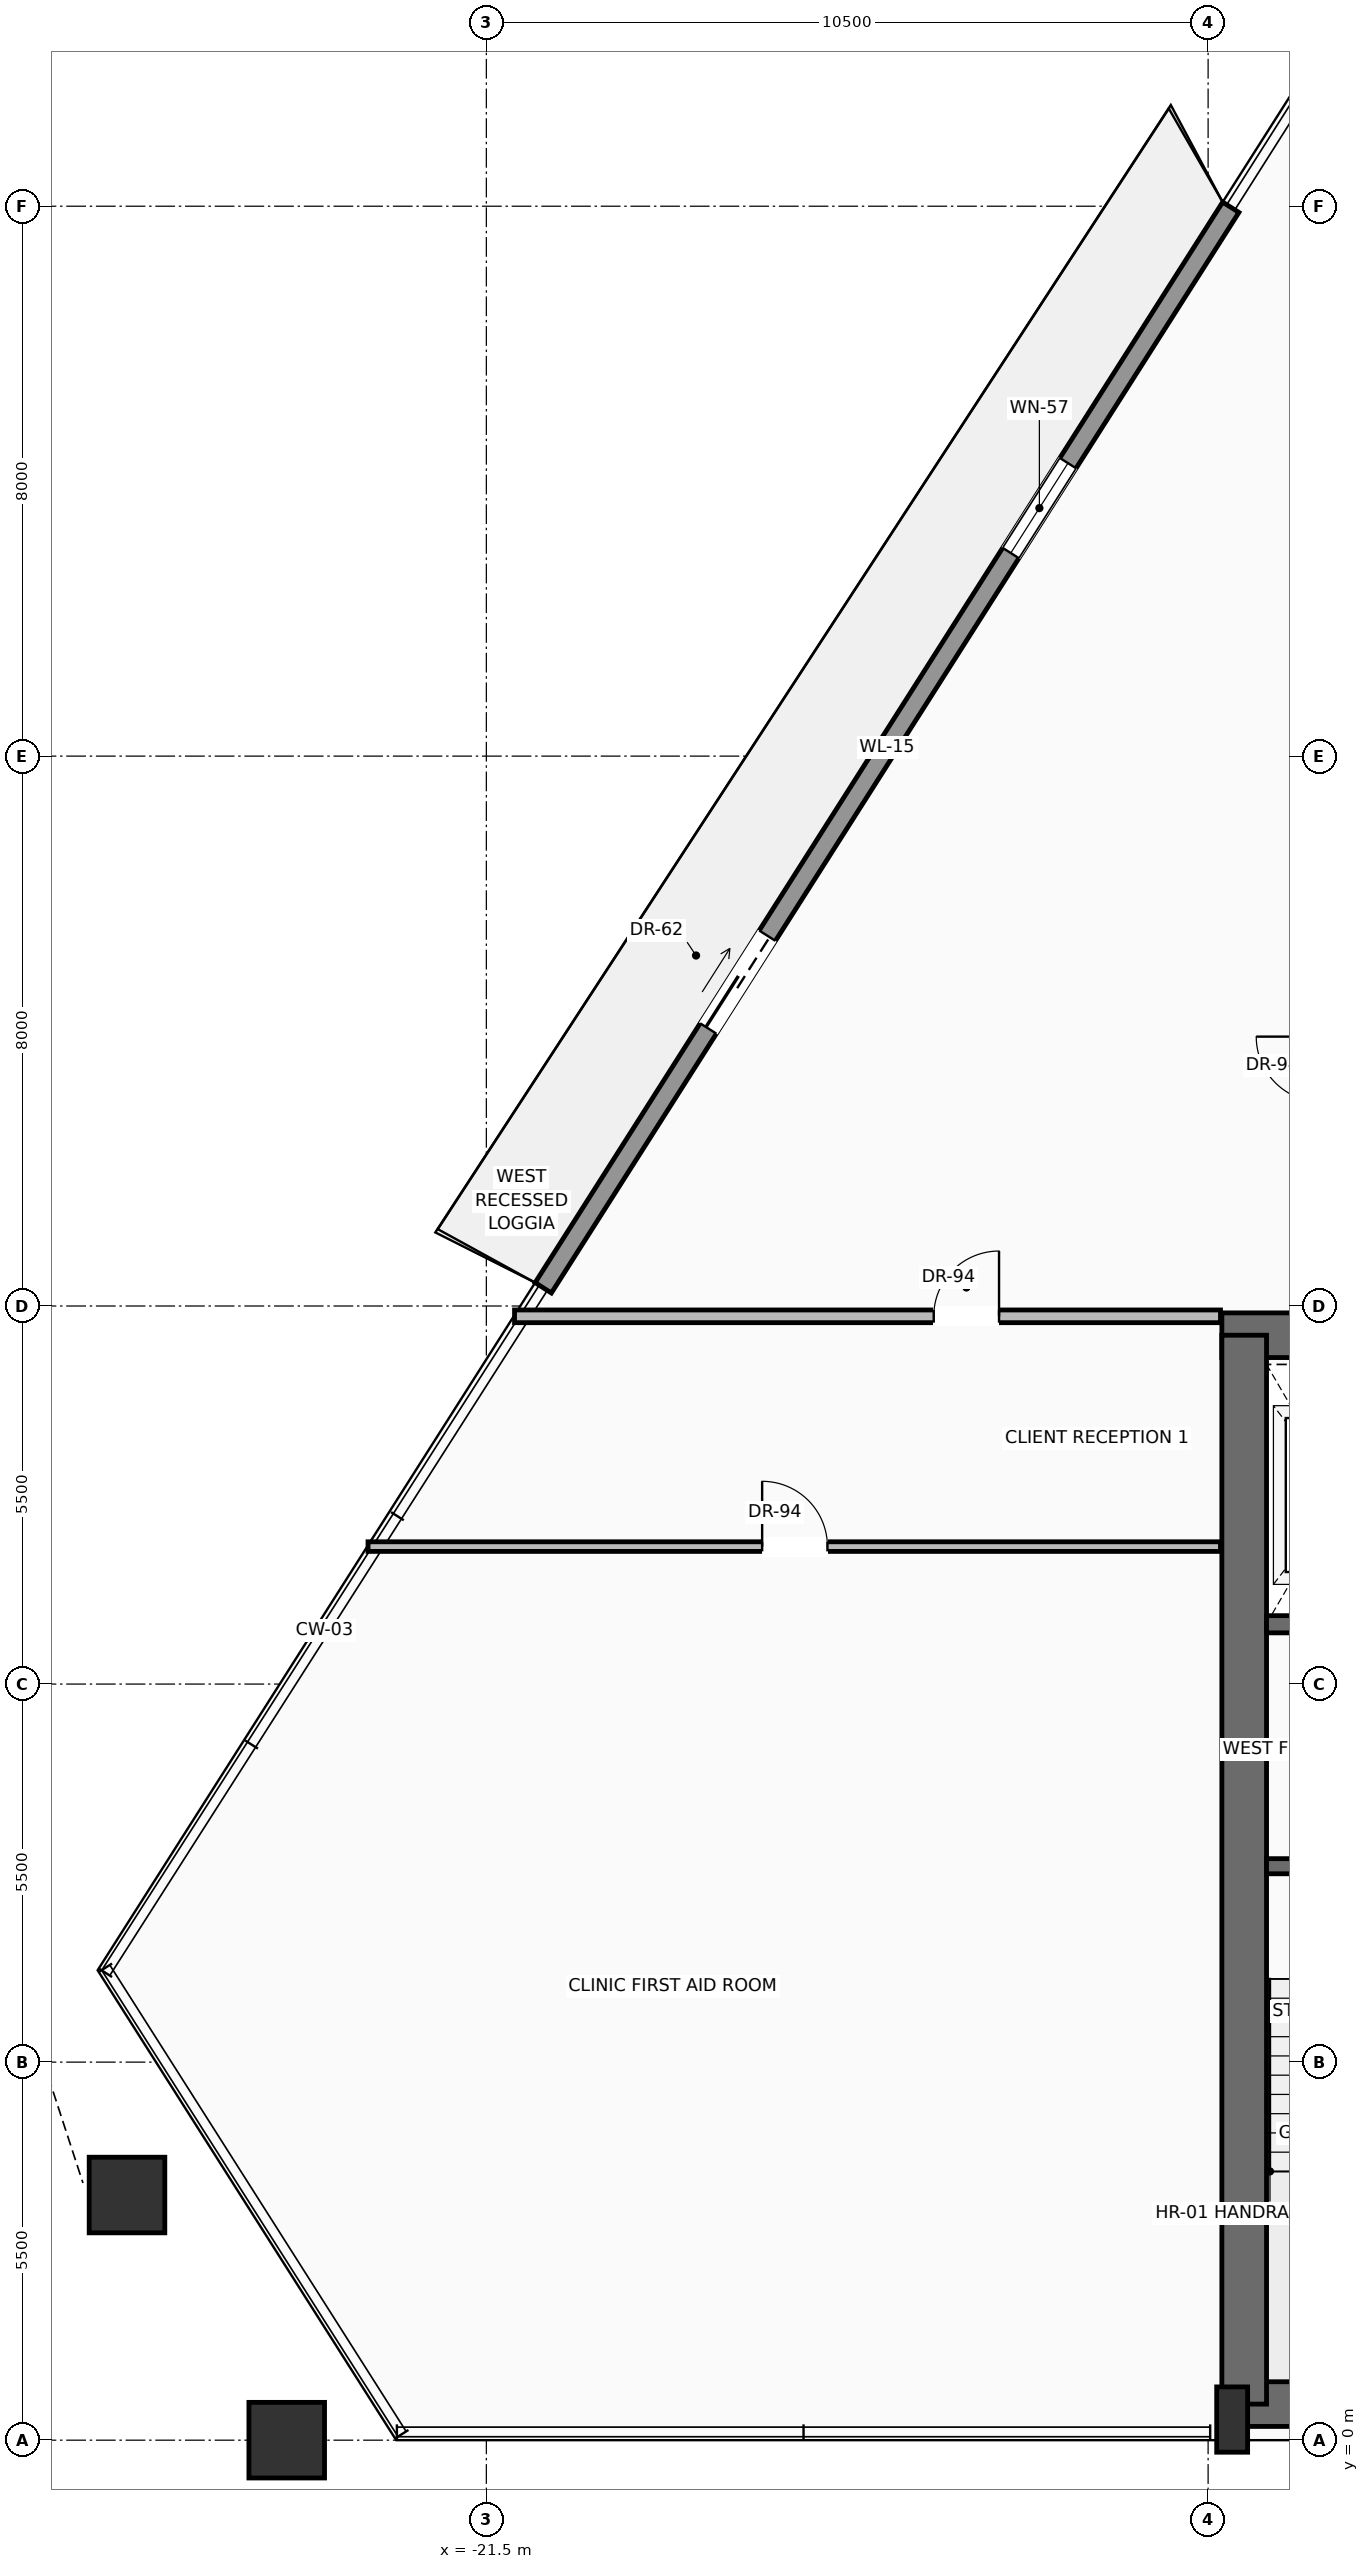
"""IFC4 building model, lengths in metres.
Left out: names, types, materials, properties, quantities, classifications, styles, units other than length and angle.
Written with IfcOpenShell. Run it as: python <this file> out.ifc"""

import sys

from ifc_helpers import new_model, si_unit, direction, frame, frame_2d, origin, origin_2d, place, context, subcontext, project, spatial, rectangle, hollow_rectangle, extrude, source, transform, mapped, element, fill, save


model = new_model("IFC4")
c1 = context("Model", 3, precision=1e-05, world=origin(), true_north=direction((0.0, 1.0)))
c2 = subcontext(c1, "Body", "Model", "MODEL_VIEW")
j1 = project(units=[si_unit("LENGTHUNIT", "METRE"), si_unit("PLANEANGLEUNIT", "RADIAN")], contexts=[c1])
p1 = place(None, origin())
s1 = spatial("IfcSite", under=j1, at=p1, CompositionType="ELEMENT")
p2 = place(p1, origin())
s2 = spatial("IfcBuilding", under=s1, at=p2, CompositionType="ELEMENT")
p3 = place(p2, frame((0.0, 0.0, 162.6)))
s3 = spatial("IfcBuildingStorey", under=s2, at=p3, CompositionType="ELEMENT", Elevation=162.6)
p4 = place(p3, frame((-10.65, 0.525, 0.0), z_axis=(0.0, 0.0, 1.0), x_axis=(1.0, 0.0, 0.0)))
e1 = element("IfcWall", 1, at=p4, inside=s3, PredefinedType="SHEAR", context=c2, shape_type="SweptSolid", body=[
    extrude(rectangle(XDim=21.3, YDim=0.65, at=frame_2d((10.65, 0.0))), origin(), (0.0, 0.0, 1.0), 3.4),
])
p5 = place(p3, frame((-10.8, 16.075, 0.0), z_axis=(0.0, 0.0, 1.0), x_axis=(1.0, 0.0, 0.0)))
e2 = element("IfcWall", 2, at=p5, inside=s3, PredefinedType="SHEAR", context=c2, shape_type="SweptSolid", body=[
    extrude(rectangle(XDim=21.6, YDim=0.65, at=frame_2d((10.8, 0.0))), origin(), (0.0, 0.0, 1.0), 3.4),
])
p6 = place(p5, frame((3.37, 0.0, 0.0)))
e3 = element("IfcOpeningElement", 3, at=p6, cuts=e2, PredefinedType="OPENING", context=c2, shape_type="SweptSolid", body=[
    extrude(rectangle(XDim=1.3, YDim=2.3, at=frame_2d((0.65, 1.15))), frame((0.0, 0.335, 0.0), z_axis=(0.0, -1.0, 0.0), x_axis=(1.0, 0.0, 0.0)), (0.0, 0.0, 1.0), 0.67),
])
p7 = place(p5, frame((9.8, 0.0, 0.0)))
e4 = element("IfcOpeningElement", 4, at=p7, cuts=e2, PredefinedType="OPENING", context=c2, shape_type="SweptSolid", body=[
    extrude(rectangle(XDim=2.0, YDim=2.4, at=frame_2d((1.0, 1.2))), frame((0.0, 0.335, 0.0), z_axis=(0.0, -1.0, 0.0), x_axis=(1.0, 0.0, 0.0)), (0.0, 0.0, 1.0), 0.67),
])
p8 = place(p3, frame((-10.475, 0.525, 0.0), z_axis=(0.0, 0.0, 1.0), x_axis=(0.0, 1.0, 0.0)))
e5 = element("IfcWall", 5, at=p8, inside=s3, PredefinedType="SHEAR", context=c2, shape_type="SweptSolid", body=[
    extrude(rectangle(XDim=15.55, YDim=0.65, at=frame_2d((7.775, 0.0))), origin(), (0.0, 0.0, 1.0), 3.4),
])
m1 = source(origin(), c2, "Body", "SweptSolid", [
    extrude(rectangle(XDim=0.45, YDim=0.95, at=origin_2d()), origin(), (0.0, 0.0, 1.0), 3.7),
])
p9 = place(p3, frame((-10.65, 0.3, 0.0), z_axis=(0.0, 0.0, 1.0), x_axis=(1.0, 0.0, 0.0)))
e6 = element("IfcColumn", 6, at=p9, inside=s3, PredefinedType="PILASTER", context=c2, shape_type="MappedRepresentation", body=[
    mapped(m1, transform((0.0, 0.0, 0.0), scale=1.0)),
])
m2 = source(origin(), c2, "Body", "SweptSolid", [
    extrude(hollow_rectangle(XDim=1.1, YDim=1.1, WallThickness=0.055, at=origin_2d()), origin(), (0.0, 0.0, 1.0), 3.691),
])
p10 = place(p3, frame((-24.404, 0.0, 0.004), z_axis=(-0.009061073869, 0.0, 0.999958947628), x_axis=(0.0, -1.0, 0.0)))
e7 = element("IfcColumn", 7, at=p10, inside=s3, PredefinedType="COLUMN", context=c2, shape_type="MappedRepresentation", body=[
    mapped(m2, transform((0.0, 0.0, 0.0), scale=1.0)),
])
m3 = source(origin(), c2, "Body", "SweptSolid", [
    extrude(hollow_rectangle(XDim=1.1, YDim=1.1, WallThickness=0.055, at=origin_2d()), origin(), (0.0, 0.0, 1.0), 3.692),
])
p11 = place(p3, frame((-26.728, 3.566, 0.004), z_axis=(0.001454940894, -0.015739815131, 0.999875062879), x_axis=(0.995754888126, 0.092044569491, 0.0)))
e8 = element("IfcColumn", 8, at=p11, inside=s3, PredefinedType="COLUMN", context=c2, shape_type="MappedRepresentation", body=[
    mapped(m3, transform((0.0, 0.0, 0.0), scale=1.0)),
])
p12 = place(p3, frame((-20.672, 16.765, 0.0), z_axis=(0.0, 0.0, 1.0), x_axis=(0.53680257422, 0.843707885651, 0.0)))
e9 = element("IfcWall", 9, at=p12, inside=s3, PredefinedType="SOLIDWALL", context=c2, shape_type="SweptSolid", body=[
    extrude(rectangle(XDim=18.632, YDim=0.28, at=frame_2d((9.316, 0.0))), origin(), (0.0, 0.0, 1.0), 2.98),
])
p13 = place(p12, frame((4.472, 0.0, 0.0)))
e10 = element("IfcOpeningElement", 10, at=p13, cuts=e9, PredefinedType="OPENING", context=c2, shape_type="SweptSolid", body=[
    extrude(rectangle(XDim=1.6, YDim=2.35, at=frame_2d((0.8, 1.175))), frame((0.0, 0.15, 0.0), z_axis=(0.0, -1.0, 0.0), x_axis=(1.0, 0.0, 0.0)), (0.0, 0.0, 1.0), 0.3),
])
p14 = place(p12, frame((12.67, 0.0, 0.9)))
e11 = element("IfcOpeningElement", 11, at=p14, cuts=e9, PredefinedType="OPENING", context=c2, shape_type="SweptSolid", body=[
    extrude(rectangle(XDim=1.55, YDim=1.85, at=frame_2d((0.775, 0.925))), frame((0.0, 0.15, 0.0), z_axis=(0.0, -1.0, 0.0), x_axis=(1.0, 0.0, 0.0)), (0.0, 0.0, 1.0), 0.3),
])
p15 = place(p3, frame((-5.5, 8.35, 0.0), z_axis=(0.0, 0.0, 1.0), x_axis=(-1.0, 0.0, 0.0)))
e12 = element("IfcWall", 12, at=p15, inside=s3, PredefinedType="SOLIDWALL", context=c2, shape_type="SweptSolid", body=[
    extrude(rectangle(XDim=4.65, YDim=0.22, at=frame_2d((2.325, 0.0))), origin(), (0.0, 0.0, 1.0), 3.4),
])
p16 = place(p15, frame((2.5, 0.0, 0.0)))
e13 = element("IfcOpeningElement", 13, at=p16, cuts=e12, PredefinedType="OPENING", context=c2, shape_type="SweptSolid", body=[
    extrude(rectangle(XDim=1.15, YDim=2.2, at=frame_2d((0.575, 1.1))), frame((0.0, 0.12, 0.0), z_axis=(0.0, -1.0, 0.0), x_axis=(1.0, 0.0, 0.0)), (0.0, 0.0, 1.0), 0.24),
])
p17 = place(p3, frame((-5.5, 11.87, 0.0), z_axis=(0.0, 0.0, 1.0), x_axis=(-1.0, 0.0, 0.0)))
e14 = element("IfcWall", 14, at=p17, inside=s3, PredefinedType="SOLIDWALL", context=c2, shape_type="SweptSolid", body=[
    extrude(rectangle(XDim=4.65, YDim=0.25, at=frame_2d((2.325, 0.0))), origin(), (0.0, 0.0, 1.0), 3.4),
])
p18 = place(p17, frame((2.95, 0.0, 0.0)))
e15 = element("IfcOpeningElement", 15, at=p18, cuts=e14, PredefinedType="OPENING", context=c2, shape_type="SweptSolid", body=[
    extrude(rectangle(XDim=1.2, YDim=2.25, at=frame_2d((0.6, 1.125))), frame((0.0, 0.135, 0.0), z_axis=(0.0, -1.0, 0.0), x_axis=(1.0, 0.0, 0.0)), (0.0, 0.0, 1.0), 0.27),
])
p19 = place(p3, frame((-21.09, 16.35, 0.0), z_axis=(0.0, 0.0, 1.0), x_axis=(1.0, 0.0, 0.0)))
e16 = element("IfcWall", 16, at=p19, inside=s3, PredefinedType="PARTITIONING", context=c2, shape_type="SweptSolid", body=[
    extrude(rectangle(XDim=10.27, YDim=0.185, at=frame_2d((5.135, 0.0))), origin(), (0.0, 0.0, 1.0), 3.392),
])
p20 = place(p19, frame((6.098, 0.0, 0.0)))
e17 = element("IfcOpeningElement", 17, at=p20, cuts=e16, PredefinedType="OPENING", context=c2, shape_type="SweptSolid", body=[
    extrude(rectangle(XDim=0.95, YDim=2.2, at=frame_2d((0.475, 1.1))), frame((0.0, 0.103, 0.0), z_axis=(0.0, -1.0, 0.0), x_axis=(1.0, 0.0, 0.0)), (0.0, 0.0, 1.0), 0.205),
])
p21 = place(p3, frame((-23.221, 13.0, 0.0), z_axis=(0.0, 0.0, 1.0), x_axis=(1.0, 0.0, 0.0)))
e18 = element("IfcWall", 18, at=p21, inside=s3, PredefinedType="PARTITIONING", context=c2, shape_type="SweptSolid", body=[
    extrude(rectangle(XDim=12.401, YDim=0.14, at=frame_2d((6.201, 0.0))), origin(), (0.0, 0.0, 1.0), 3.392),
])
p22 = place(p21, frame((5.733, 0.0, 0.0)))
e19 = element("IfcOpeningElement", 19, at=p22, cuts=e18, PredefinedType="OPENING", context=c2, shape_type="SweptSolid", body=[
    extrude(rectangle(XDim=0.95, YDim=2.2, at=frame_2d((0.475, 1.1))), frame((0.0, 0.08, 0.0), z_axis=(0.0, -1.0, 0.0), x_axis=(1.0, 0.0, 0.0)), (0.0, 0.0, 1.0), 0.16),
])
m4 = source(origin(), c2, "Body", "SweptSolid", [
    extrude(rectangle(XDim=1.6, YDim=2.35, at=frame_2d((0.8, 1.175))), frame((0.0, 0.025, 0.0), z_axis=(0.0, -1.0, 0.0), x_axis=(1.0, 0.0, 0.0)), (0.0, 0.0, 1.0), 0.05),
])
p23 = place(p13, origin())
e20 = element("IfcDoor", 20, at=p23, inside=s3, OperationType="SLIDING_TO_LEFT", PredefinedType="DOOR", context=c2, shape_type="MappedRepresentation", body=[
    mapped(m4, transform((0.0, 0.0, 0.0), scale=1.0)),
])
fill(e10, e20)
m5 = source(origin(), c2, "Body", "SweptSolid", [
    extrude(rectangle(XDim=1.55, YDim=1.85, at=frame_2d((0.775, 0.925))), frame((0.0, 0.03, 0.0), z_axis=(0.0, -1.0, 0.0), x_axis=(1.0, 0.0, 0.0)), (0.0, 0.0, 1.0), 0.06),
])
p24 = place(p14, origin())
e21 = element("IfcWindow", 21, at=p24, inside=s3, PartitioningType="SINGLE_PANEL", PredefinedType="WINDOW", context=c2, shape_type="MappedRepresentation", body=[
    mapped(m5, transform((0.0, 0.0, 0.0), scale=1.0)),
])
fill(e11, e21)
m6 = source(origin(), c2, "Body", "SweptSolid", [
    extrude(rectangle(XDim=0.95, YDim=2.2, at=frame_2d((0.475, 1.1))), frame((0.0, 0.025, 0.0), z_axis=(0.0, -1.0, 0.0), x_axis=(1.0, 0.0, 0.0)), (0.0, 0.0, 1.0), 0.05),
])
p25 = place(p20, origin())
e22 = element("IfcDoor", 22, at=p25, inside=s3, OperationType="SINGLE_SWING_RIGHT", PredefinedType="DOOR", context=c2, shape_type="MappedRepresentation", body=[
    mapped(m6, transform((0.0, 0.0, 0.0), scale=1.0)),
])
fill(e17, e22)
p26 = place(p22, origin())
e23 = element("IfcDoor", 23, at=p26, inside=s3, OperationType="SINGLE_SWING_LEFT", PredefinedType="DOOR", context=c2, shape_type="MappedRepresentation", body=[
    mapped(m6, transform((0.0, 0.0, 0.0), scale=1.0)),
])
fill(e19, e23)
save(model, sys.argv[1])
